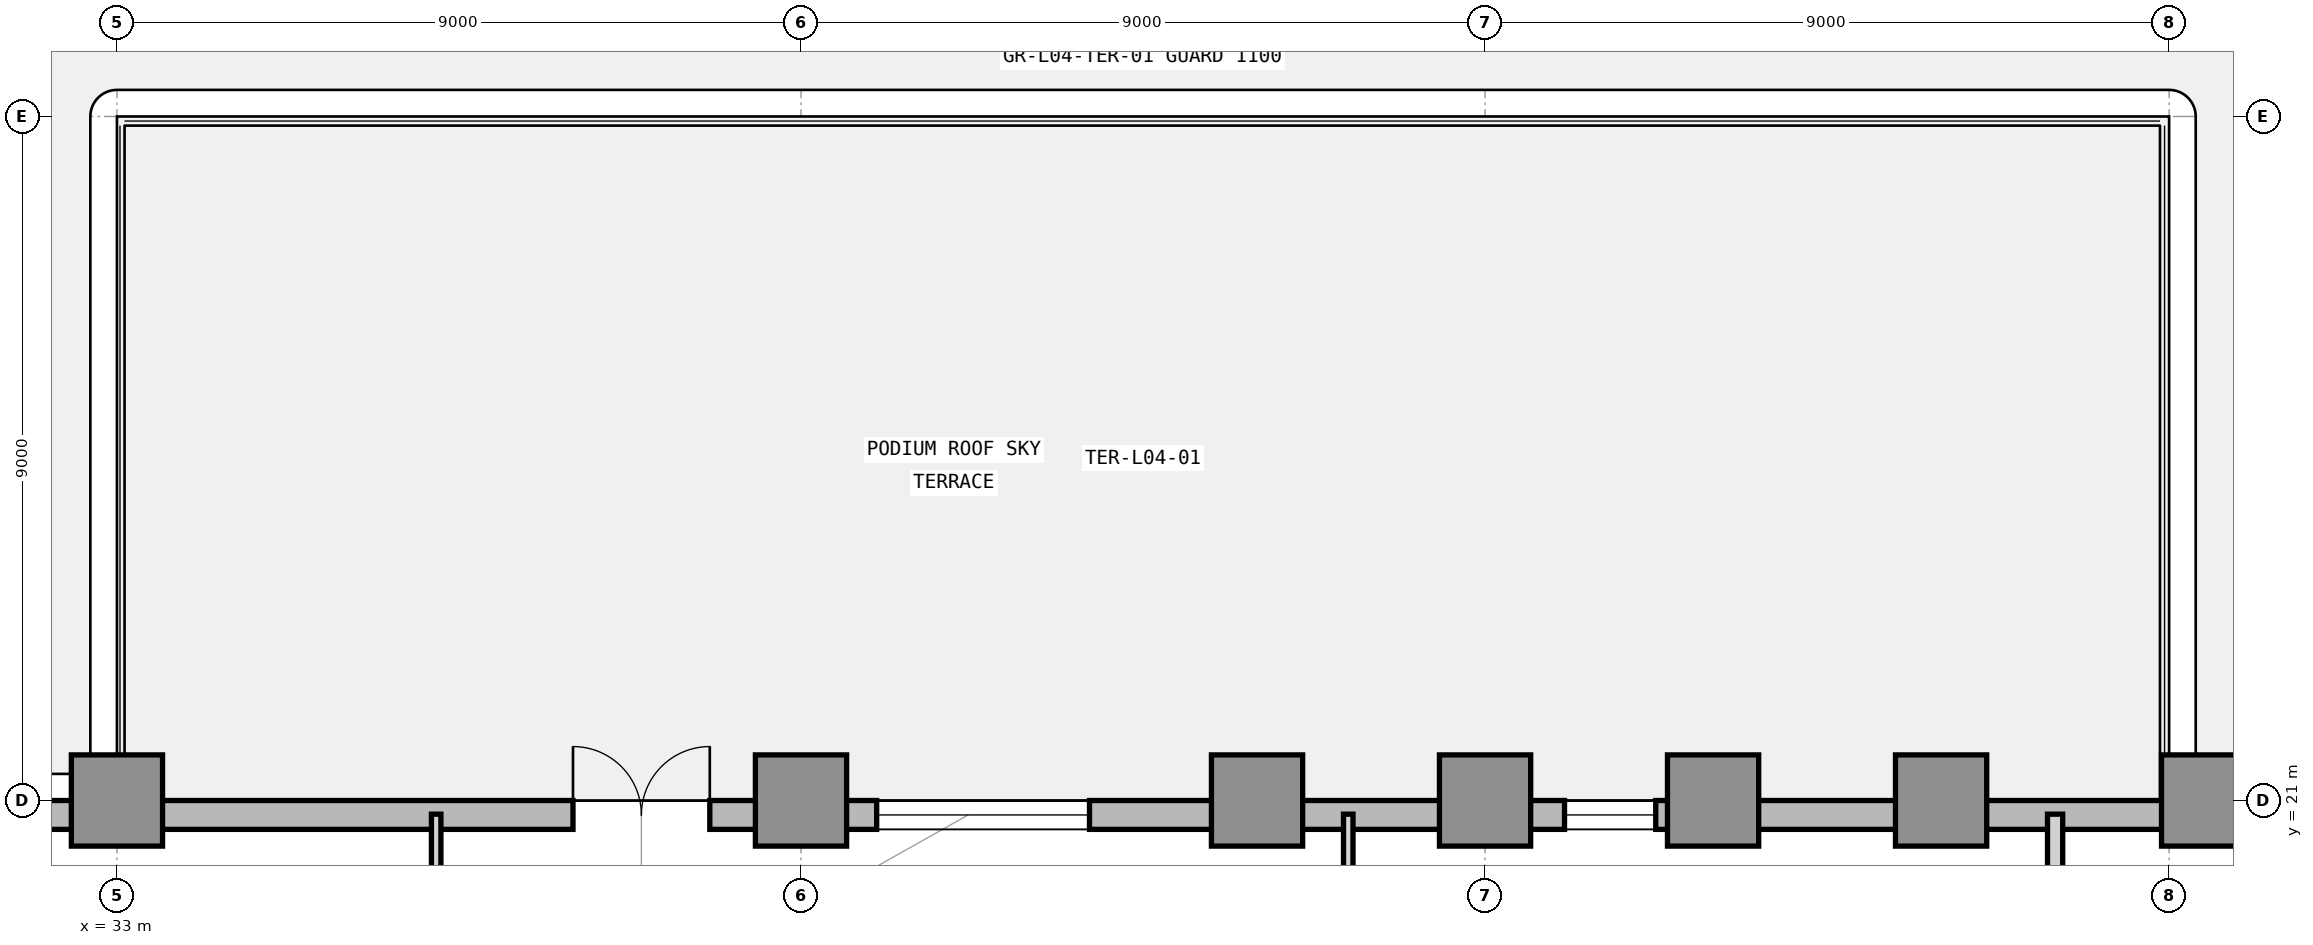
"""IFC4 building model, lengths in metres.
Left out: names, types, materials, properties, quantities, classifications, styles, units other than length and angle.
Written with IfcOpenShell. Run it as: python <this file> out.ifc"""

import sys

from ifc_helpers import new_model, si_unit, direction, frame, frame_2d, origin, origin_2d, place, context, subcontext, project, spatial, rectangle, extrude, element, fill, save


model = new_model("IFC4")
c1 = context("Model", 3, precision=1e-05, world=origin(), true_north=direction((0.0, 1.0)))
c2 = subcontext(c1, "Body", "Model", "MODEL_VIEW")
j1 = project(units=[si_unit("LENGTHUNIT", "METRE"), si_unit("PLANEANGLEUNIT", "RADIAN")], contexts=[c1])
p1 = place(None, origin())
s1 = spatial("IfcSite", under=j1, at=p1, CompositionType="ELEMENT")
p2 = place(p1, origin())
s2 = spatial("IfcBuilding", under=s1, at=p2, CompositionType="ELEMENT")
p3 = place(p2, frame((0.0, 0.0, 21.6)))
s3 = spatial("IfcBuildingStorey", under=s2, at=p3, CompositionType="ELEMENT", Elevation=21.6)
for number, where, z_axis, x_axis in (
    (1, (33.0, 21.0, 0.0), (0.0, 0.0, 1.0), (1.0, 0.0, 0.0)),
    (2, (42.0, 21.0, 0.0), (0.0, 0.0, 1.0), (1.0, 0.0, 0.0)),
    (3, (48.0, 21.0, 0.0), (0.0, 0.0, 1.0), (1.0, 0.0, 0.0)),
    (4, (51.0, 21.0, 0.0), (0.0, 0.0, 1.0), (1.0, 0.0, 0.0)),
    (5, (54.0, 21.0, 0.0), (0.0, 0.0, 1.0), (1.0, 0.0, 0.0)),
    (6, (57.0, 21.0, 0.0), (0.0, 0.0, 1.0), (1.0, 0.0, 0.0)),
    (7, (60.5, 21.0, 0.0), (0.0, 0.0, 1.0), (1.0, 0.0, 0.0)),
):
    element("IfcColumn", number, at=place(p3, frame(where, z_axis=z_axis, x_axis=x_axis)), inside=s3, PredefinedType="COLUMN", context=c2, shape_type="SweptSolid", body=[
        extrude(rectangle(XDim=1.2, YDim=1.2, at=origin_2d()), origin(), (0.0, 0.0, 1.0), 4.2),
    ])
p4 = place(p3, frame((64.4, 20.81, 0.0), z_axis=(0.0, 0.0, 1.0), x_axis=(-1.0, 0.0, 0.0)))
e8 = element("IfcWall", 8, at=p4, inside=s3, PredefinedType="STANDARD", context=c2, shape_type="SweptSolid", body=[
    extrude(rectangle(XDim=40.4, YDim=0.38, at=frame_2d((20.2, 0.0))), origin(), (0.0, 0.0, 1.0), 3.98),
])
p5 = place(p4, frame((23.6, 0.0, 0.0)))
e9 = element("IfcOpeningElement", 9, at=p5, cuts=e8, PredefinedType="OPENING", context=c2, shape_type="SweptSolid", body=[
    extrude(rectangle(XDim=1.8, YDim=2.35, at=frame_2d((0.9, 1.175))), frame((0.0, 0.2, 0.0), z_axis=(0.0, -1.0, 0.0), x_axis=(1.0, 0.0, 0.0)), (0.0, 0.0, 1.0), 0.4),
])
p6 = place(p4, frame((38.234, 0.0, 0.85)))
e10 = element("IfcOpeningElement", 10, at=p6, cuts=e8, PredefinedType="OPENING", context=c2, shape_type="SweptSolid", body=[
    extrude(rectangle(XDim=1.2, YDim=2.45, at=frame_2d((0.6, 1.225))), frame((0.0, 0.2, 0.0), z_axis=(0.0, -1.0, 0.0), x_axis=(1.0, 0.0, 0.0)), (0.0, 0.0, 1.0), 0.4),
])
p7 = place(p4, frame((32.354, 0.0, 0.85)))
e11 = element("IfcOpeningElement", 11, at=p7, cuts=e8, PredefinedType="OPENING", context=c2, shape_type="SweptSolid", body=[
    extrude(rectangle(XDim=2.8, YDim=2.45, at=frame_2d((1.4, 1.225))), frame((0.0, 0.2, 0.0), z_axis=(0.0, -1.0, 0.0), x_axis=(1.0, 0.0, 0.0)), (0.0, 0.0, 1.0), 0.4),
])
p8 = place(p4, frame((18.604, 0.0, 0.85)))
e12 = element("IfcOpeningElement", 12, at=p8, cuts=e8, PredefinedType="OPENING", context=c2, shape_type="SweptSolid", body=[
    extrude(rectangle(XDim=2.8, YDim=2.45, at=frame_2d((1.4, 1.225))), frame((0.0, 0.2, 0.0), z_axis=(0.0, -1.0, 0.0), x_axis=(1.0, 0.0, 0.0)), (0.0, 0.0, 1.0), 0.4),
])
p9 = place(p4, frame((11.154, 0.0, 0.85)))
e13 = element("IfcOpeningElement", 13, at=p9, cuts=e8, PredefinedType="OPENING", context=c2, shape_type="SweptSolid", body=[
    extrude(rectangle(XDim=1.2, YDim=2.45, at=frame_2d((0.6, 1.225))), frame((0.0, 0.2, 0.0), z_axis=(0.0, -1.0, 0.0), x_axis=(1.0, 0.0, 0.0)), (0.0, 0.0, 1.0), 0.4),
])
for number, where, z_axis, x_axis in (
    (14, (37.2, 13.05, 0.0), (0.0, 0.0, 1.0), (0.0, 1.0, 0.0)),
    (15, (49.2, 13.05, 0.0), (0.0, 0.0, 1.0), (0.0, 1.0, 0.0)),
):
    element("IfcWall", number, at=place(p3, frame(where, z_axis=z_axis, x_axis=x_axis)), inside=s3, PredefinedType="PARTITIONING", context=c2, shape_type="SweptSolid", body=[
        extrude(rectangle(XDim=7.77, YDim=0.125, at=frame_2d((3.885, 0.0))), origin(), (0.0, 0.0, 1.0), 3.97),
    ])
p10 = place(p3, frame((58.5, 3.18, 0.0), z_axis=(0.0, 0.0, 1.0), x_axis=(0.0, 1.0, 0.0)))
e16 = element("IfcWall", 16, at=p10, inside=s3, PredefinedType="PARTITIONING", context=c2, shape_type="SweptSolid", body=[
    extrude(rectangle(XDim=17.64, YDim=0.2, at=frame_2d((8.82, 0.0))), origin(), (0.0, 0.0, 1.0), 3.97),
])
p11 = place(p10, frame((8.075, 0.0, 0.0)))
e17 = element("IfcOpeningElement", 17, at=p11, cuts=e16, PredefinedType="OPENING", context=c2, shape_type="SweptSolid", body=[
    extrude(rectangle(XDim=1.0, YDim=2.15, at=frame_2d((0.5, 1.075))), frame((0.0, 0.11, 0.0), z_axis=(0.0, -1.0, 0.0), x_axis=(1.0, 0.0, 0.0)), (0.0, 0.0, 1.0), 0.22),
])
p12 = place(p5, frame((1.8, 0.0, 0.0), z_axis=(0.0, 0.0, 1.0), x_axis=(-1.0, 0.0, 0.0)))
e18 = element("IfcDoor", 18, at=p12, inside=s3, OperationType="DOUBLE_DOOR_SINGLE_SWING", PredefinedType="DOOR", context=c2, shape_type="SweptSolid", body=[
    extrude(rectangle(XDim=1.8, YDim=2.35, at=frame_2d((0.9, 1.175))), frame((0.0, 0.025, 0.0), z_axis=(0.0, -1.0, 0.0), x_axis=(1.0, 0.0, 0.0)), (0.0, 0.0, 1.0), 0.05),
])
fill(e9, e18)
p13 = place(p8, origin())
e19 = element("IfcWindow", 19, at=p13, inside=s3, PartitioningType="SINGLE_PANEL", PredefinedType="WINDOW", context=c2, shape_type="SweptSolid", body=[
    extrude(rectangle(XDim=2.8, YDim=2.45, at=frame_2d((1.4, 1.225))), frame((0.0, 0.11, 0.0), z_axis=(0.0, -1.0, 0.0), x_axis=(1.0, 0.0, 0.0)), (0.0, 0.0, 1.0), 0.06),
])
fill(e12, e19)
p14 = place(p9, origin())
e20 = element("IfcWindow", 20, at=p14, inside=s3, PartitioningType="SINGLE_PANEL", PredefinedType="WINDOW", context=c2, shape_type="SweptSolid", body=[
    extrude(rectangle(XDim=1.2, YDim=2.45, at=frame_2d((0.6, 1.225))), frame((0.0, 0.11, 0.0), z_axis=(0.0, -1.0, 0.0), x_axis=(1.0, 0.0, 0.0)), (0.0, 0.0, 1.0), 0.06),
])
fill(e13, e20)
save(model, sys.argv[1])
